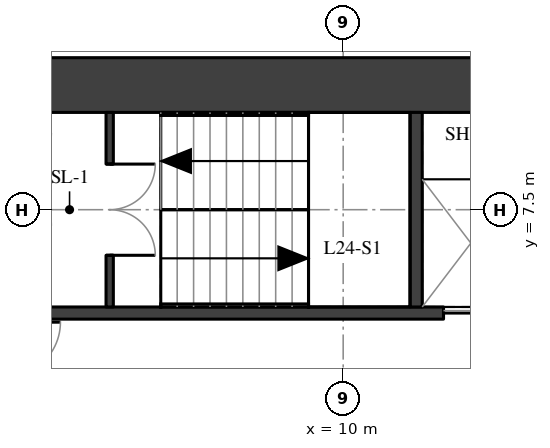
"""IFC4 building model, lengths in metres.
Left out: names, types, materials, properties, quantities, classifications, styles, units other than length and angle.
Written with IfcOpenShell. Run it as: python <this file> out.ifc"""

import sys

from ifc_helpers import new_model, si_unit, direction, frame, frame_2d, origin, place, context, subcontext, project, spatial, rectangle, extrude, element, fill, save


model = new_model("IFC4")
c1 = context("Model", 3, precision=1e-05, world=origin(), true_north=direction((0.0, 1.0)))
c2 = subcontext(c1, "Body", "Model", "MODEL_VIEW")
j1 = project(units=[si_unit("LENGTHUNIT", "METRE"), si_unit("PLANEANGLEUNIT", "RADIAN")], contexts=[c1])
p1 = place(None, origin())
s1 = spatial("IfcSite", under=j1, at=p1, CompositionType="ELEMENT")
p2 = place(p1, origin())
s2 = spatial("IfcBuilding", under=s1, at=p2, CompositionType="ELEMENT")
p3 = place(p2, frame((0.0, 0.0, 88.9)))
s3 = spatial("IfcBuildingStorey", under=s2, at=p3, CompositionType="ELEMENT", Elevation=88.9)
p4 = place(p3, frame((4.9, 9.55, 0.0), z_axis=(0.0, 0.0, 1.0), x_axis=(1.0, 0.0, 0.0)))
e1 = element("IfcWall", 1, at=p4, inside=s3, PredefinedType="SHEAR", context=c2, shape_type="SweptSolid", body=[
    extrude(rectangle(XDim=10.2, YDim=0.9, at=frame_2d((5.1, 0.0))), origin(), (0.0, 0.0, 1.0), 3.02),
])
p5 = place(p3, frame((4.9, 5.8, 0.0), z_axis=(0.0, 0.0, 1.0), x_axis=(1.0, 0.0, 0.0)))
e2 = element("IfcWall", 2, at=p5, inside=s3, PredefinedType="SHEAR", context=c2, shape_type="SweptSolid", body=[
    extrude(rectangle(XDim=10.2, YDim=0.2, at=frame_2d((5.1, 0.0))), origin(), (0.0, 0.0, 1.0), 3.02),
])
p6 = place(p5, frame((6.75, 0.0, 0.0)))
e3 = element("IfcOpeningElement", 3, at=p6, cuts=e2, PredefinedType="OPENING", context=c2, shape_type="SweptSolid", body=[
    extrude(rectangle(XDim=1.1, YDim=2.1, at=frame_2d((0.55, 1.05))), frame((0.0, 0.11, 0.0), z_axis=(0.0, -1.0, 0.0), x_axis=(1.0, 0.0, 0.0)), (0.0, 0.0, 1.0), 0.22),
])
p7 = place(p5, frame((8.75, 0.0, 0.0)))
e4 = element("IfcOpeningElement", 4, at=p7, cuts=e2, PredefinedType="OPENING", context=c2, shape_type="SweptSolid", body=[
    extrude(rectangle(XDim=1.1, YDim=2.1, at=frame_2d((0.55, 1.05))), frame((0.0, 0.11, 0.0), z_axis=(0.0, -1.0, 0.0), x_axis=(1.0, 0.0, 0.0)), (0.0, 0.0, 1.0), 0.22),
])
p8 = place(p3, frame((11.2, 5.9, 0.0), z_axis=(0.0, 0.0, 1.0), x_axis=(0.0, 1.0, 0.0)))
e5 = element("IfcWall", 5, at=p8, inside=s3, PredefinedType="SHEAR", context=c2, shape_type="SweptSolid", body=[
    extrude(rectangle(XDim=3.2, YDim=0.2, at=frame_2d((1.6, 0.0))), origin(), (0.0, 0.0, 1.0), 3.02),
])
p9 = place(p3, frame((6.16, 5.9, 0.0), z_axis=(0.0, 0.0, 1.0), x_axis=(0.0, 1.0, 0.0)))
e6 = element("IfcWall", 6, at=p9, inside=s3, PredefinedType="SHEAR", context=c2, shape_type="SweptSolid", body=[
    extrude(rectangle(XDim=3.2, YDim=0.12, at=frame_2d((1.6, 0.0))), origin(), (0.0, 0.0, 1.0), 3.02),
])
p10 = place(p9, frame((0.85, 0.0, 0.0)))
e7 = element("IfcOpeningElement", 7, at=p10, cuts=e6, PredefinedType="OPENING", context=c2, shape_type="SweptSolid", body=[
    extrude(rectangle(XDim=1.5, YDim=2.1, at=frame_2d((0.75, 1.05))), frame((0.0, 0.07, 0.0), z_axis=(0.0, -1.0, 0.0), x_axis=(1.0, 0.0, 0.0)), (0.0, 0.0, 1.0), 0.14),
])
p11 = place(p10, origin())
e8 = element("IfcDoor", 8, at=p11, inside=s3, OperationType="DOUBLE_DOOR_SINGLE_SWING", PredefinedType="DOOR", context=c2, shape_type="SweptSolid", body=[
    extrude(rectangle(XDim=1.5, YDim=2.1, at=frame_2d((0.75, 1.05))), frame((0.0, 0.025, 0.0), z_axis=(0.0, -1.0, 0.0), x_axis=(1.0, 0.0, 0.0)), (0.0, 0.0, 1.0), 0.05),
])
fill(e7, e8)
p12 = place(p6, origin())
e9 = element("IfcDoor", 9, at=p12, inside=s3, OperationType="DOUBLE_DOOR_SLIDING", PredefinedType="DOOR", context=c2, shape_type="SweptSolid", body=[
    extrude(rectangle(XDim=1.1, YDim=2.1, at=frame_2d((0.55, 1.05))), frame((0.0, 0.025, 0.0), z_axis=(0.0, -1.0, 0.0), x_axis=(1.0, 0.0, 0.0)), (0.0, 0.0, 1.0), 0.05),
])
fill(e3, e9)
save(model, sys.argv[1])
